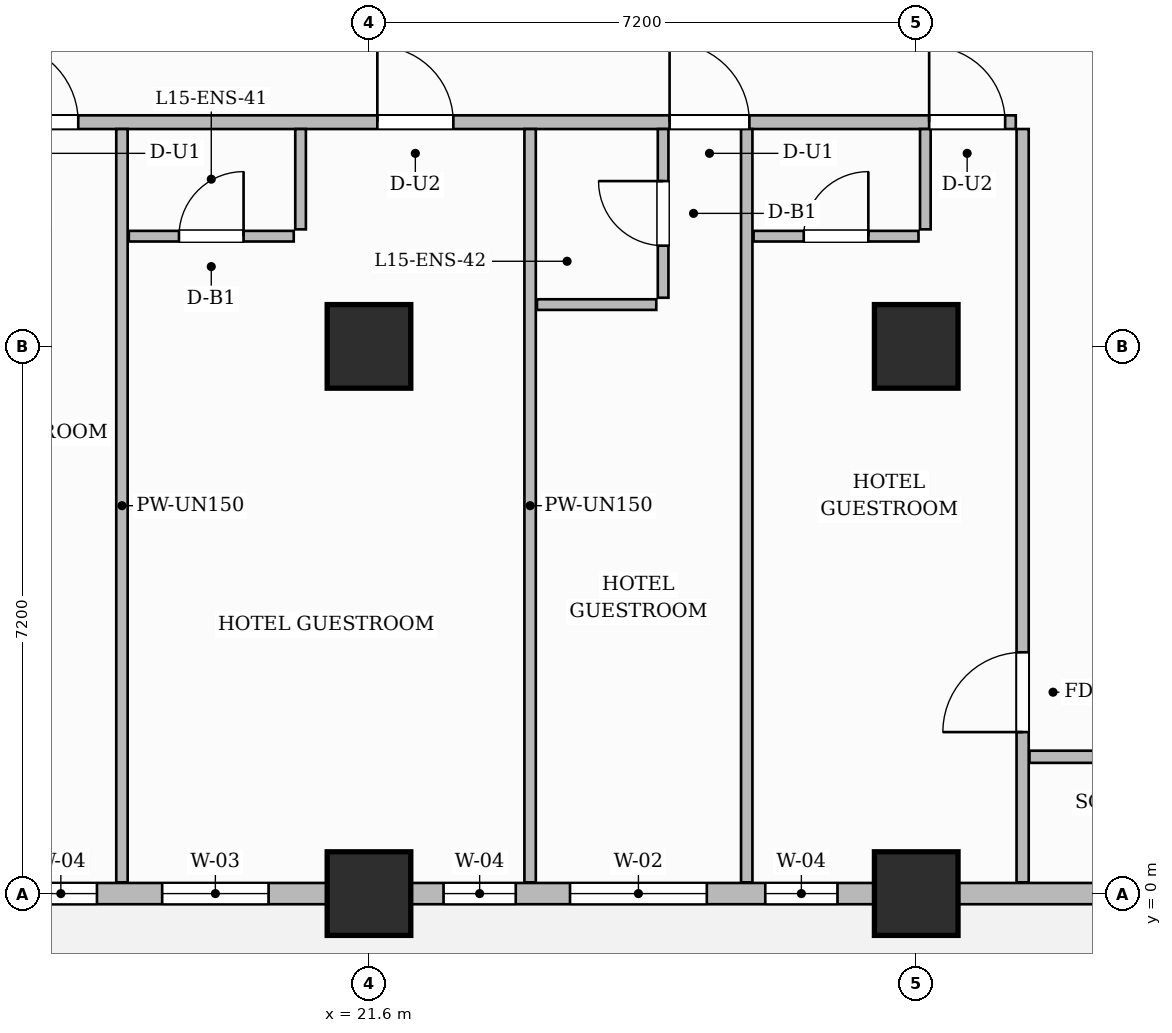
"""IFC4 building model, lengths in metres.
Left out: names, types, materials, properties, quantities, classifications, styles, units other than length and angle.
Written with IfcOpenShell. Run it as: python <this file> out.ifc"""

import sys

from ifc_helpers import new_model, si_unit, direction, frame, frame_2d, origin, origin_2d, place, context, subcontext, project, spatial, rectangle, extrude, source, transform, mapped, element, fill, save


model = new_model("IFC4")
c1 = context("Model", 3, precision=1e-05, world=origin(), true_north=direction((0.0, 1.0)))
c2 = subcontext(c1, "Body", "Model", "MODEL_VIEW")
j1 = project(units=[si_unit("LENGTHUNIT", "METRE"), si_unit("PLANEANGLEUNIT", "RADIAN")], contexts=[c1])
p1 = place(None, origin())
s1 = spatial("IfcSite", under=j1, at=p1, CompositionType="ELEMENT")
p2 = place(p1, origin())
s2 = spatial("IfcBuilding", under=s1, at=p2, CompositionType="ELEMENT")
p3 = place(p2, frame((0.0, 0.0, 65.7)))
s3 = spatial("IfcBuildingStorey", under=s2, at=p3, CompositionType="ELEMENT", Elevation=65.7)
m1 = source(origin(), c2, "Body", "SweptSolid", [
    extrude(rectangle(XDim=1.1, YDim=1.1, at=origin_2d()), origin(), (0.0, 0.0, 1.0), 3.7),
])
for number, where, z_axis, x_axis in (
    (1, (21.6, 0.0, 0.0), (0.0, 0.0, 1.0), (1.0, 0.0, 0.0)),
    (2, (21.6, 7.2, 0.0), (0.0, 0.0, 1.0), (1.0, 0.0, 0.0)),
    (3, (28.8, 0.0, 0.0), (0.0, 0.0, 1.0), (1.0, 0.0, 0.0)),
    (4, (28.8, 7.2, 0.0), (0.0, 0.0, 1.0), (1.0, 0.0, 0.0)),
):
    element("IfcColumn", number, at=place(p3, frame(where, z_axis=z_axis, x_axis=x_axis)), inside=s3, PredefinedType="COLUMN", context=c2, shape_type="MappedRepresentation", body=[
        mapped(m1, transform((0.0, 0.0, 0.0), scale=1.0)),
    ])
p4 = place(p3, frame((14.548, 10.15, 0.0), z_axis=(0.0, 0.0, 1.0), x_axis=(1.0, 0.0, 0.0)))
e5 = element("IfcWall", 5, at=p4, inside=s3, PredefinedType="PARTITIONING", context=c2, shape_type="SweptSolid", body=[
    extrude(rectangle(XDim=15.562, YDim=0.18, at=frame_2d((7.781, 0.0))), origin(), (0.0, 0.0, 1.0), 3.45),
])
p5 = place(p4, frame((2.177, 0.0, 0.0)))
e6 = element("IfcOpeningElement", 6, at=p5, cuts=e5, PredefinedType="OPENING", context=c2, shape_type="SweptSolid", body=[
    extrude(rectangle(XDim=1.05, YDim=2.25, at=frame_2d((0.525, 1.125))), frame((0.0, 0.1, 0.0), z_axis=(0.0, -1.0, 0.0), x_axis=(1.0, 0.0, 0.0)), (0.0, 0.0, 1.0), 0.2),
])
p6 = place(p4, frame((7.162, 0.0, 0.0)))
e7 = element("IfcOpeningElement", 7, at=p6, cuts=e5, PredefinedType="OPENING", context=c2, shape_type="SweptSolid", body=[
    extrude(rectangle(XDim=1.0, YDim=2.2, at=frame_2d((0.5, 1.1))), frame((0.0, 0.1, 0.0), z_axis=(0.0, -1.0, 0.0), x_axis=(1.0, 0.0, 0.0)), (0.0, 0.0, 1.0), 0.2),
])
p7 = place(p4, frame((11.007, 0.0, 0.0)))
e8 = element("IfcOpeningElement", 8, at=p7, cuts=e5, PredefinedType="OPENING", context=c2, shape_type="SweptSolid", body=[
    extrude(rectangle(XDim=1.05, YDim=2.25, at=frame_2d((0.525, 1.125))), frame((0.0, 0.1, 0.0), z_axis=(0.0, -1.0, 0.0), x_axis=(1.0, 0.0, 0.0)), (0.0, 0.0, 1.0), 0.2),
])
p8 = place(p4, frame((14.422, 0.0, 0.0)))
e9 = element("IfcOpeningElement", 9, at=p8, cuts=e5, PredefinedType="OPENING", context=c2, shape_type="SweptSolid", body=[
    extrude(rectangle(XDim=1.0, YDim=2.2, at=frame_2d((0.5, 1.1))), frame((0.0, 0.1, 0.0), z_axis=(0.0, -1.0, 0.0), x_axis=(1.0, 0.0, 0.0)), (0.0, 0.0, 1.0), 0.2),
])
p9 = place(p3, frame((30.2, 0.148, 0.0), z_axis=(0.0, 0.0, 1.0), x_axis=(0.0, 1.0, 0.0)))
e10 = element("IfcWall", 10, at=p9, inside=s3, PredefinedType="PARTITIONING", context=c2, shape_type="SweptSolid", body=[
    extrude(rectangle(XDim=9.912, YDim=0.16, at=frame_2d((4.956, 0.0))), origin(), (0.0, 0.0, 1.0), 3.45),
])
p10 = place(p9, frame((1.977, 0.0, 0.0)))
e11 = element("IfcOpeningElement", 11, at=p10, cuts=e10, PredefinedType="OPENING", context=c2, shape_type="SweptSolid", body=[
    extrude(rectangle(XDim=1.05, YDim=2.15, at=frame_2d((0.525, 1.075))), frame((0.0, 0.09, 0.0), z_axis=(0.0, -1.0, 0.0), x_axis=(1.0, 0.0, 0.0)), (0.0, 0.0, 1.0), 0.18),
])
p11 = place(p3, frame((30.29, 1.8, 0.0), z_axis=(0.0, 0.0, 1.0), x_axis=(1.0, 0.0, 0.0)))
e12 = element("IfcWall", 12, at=p11, inside=s3, PredefinedType="PARTITIONING", context=c2, shape_type="SweptSolid", body=[
    extrude(rectangle(XDim=19.37, YDim=0.16, at=frame_2d((9.685, 0.0))), origin(), (0.0, 0.0, 1.0), 3.45),
])
p12 = place(p11, frame((5.213, 0.0, 0.0)))
e13 = element("IfcOpeningElement", 13, at=p12, cuts=e12, PredefinedType="OPENING", context=c2, shape_type="SweptSolid", body=[
    extrude(rectangle(XDim=0.9, YDim=2.15, at=frame_2d((0.45, 1.075))), frame((0.0, 0.09, 0.0), z_axis=(0.0, -1.0, 0.0), x_axis=(1.0, 0.0, 0.0)), (0.0, 0.0, 1.0), 0.18),
])
p13 = place(p11, frame((14.06, 0.0, 0.0)))
e14 = element("IfcOpeningElement", 14, at=p13, cuts=e12, PredefinedType="OPENING", context=c2, shape_type="SweptSolid", body=[
    extrude(rectangle(XDim=0.9, YDim=2.15, at=frame_2d((0.45, 1.075))), frame((0.0, 0.09, 0.0), z_axis=(0.0, -1.0, 0.0), x_axis=(1.0, 0.0, 0.0)), (0.0, 0.0, 1.0), 0.18),
])
p14 = place(p3, frame((18.35, 0.148, 0.0), z_axis=(0.0, 0.0, 1.0), x_axis=(0.0, 1.0, 0.0)))
e15 = element("IfcWall", 15, at=p14, inside=s3, PredefinedType="PARTITIONING", context=c2, shape_type="SweptSolid", body=[
    extrude(rectangle(XDim=9.912, YDim=0.15, at=frame_2d((4.956, 0.0))), origin(), (0.0, 0.0, 1.0), 3.45),
])
p15 = place(p3, frame((20.7, 8.74, 0.0), z_axis=(0.0, 0.0, 1.0), x_axis=(0.0, 1.0, 0.0)))
e16 = element("IfcWall", 16, at=p15, inside=s3, PredefinedType="PARTITIONING", context=c2, shape_type="SweptSolid", body=[
    extrude(rectangle(XDim=1.32, YDim=0.14, at=frame_2d((0.66, 0.0))), origin(), (0.0, 0.0, 1.0), 3.45),
])
p16 = place(p3, frame((18.44, 8.65, 0.0), z_axis=(0.0, 0.0, 1.0), x_axis=(1.0, 0.0, 0.0)))
e17 = element("IfcWall", 17, at=p16, inside=s3, PredefinedType="PARTITIONING", context=c2, shape_type="SweptSolid", body=[
    extrude(rectangle(XDim=2.17, YDim=0.14, at=frame_2d((1.085, 0.0))), origin(), (0.0, 0.0, 1.0), 3.45),
])
p17 = place(p16, frame((0.66, 0.0, 0.0)))
e18 = element("IfcOpeningElement", 18, at=p17, cuts=e17, PredefinedType="OPENING", context=c2, shape_type="SweptSolid", body=[
    extrude(rectangle(XDim=0.85, YDim=2.1, at=frame_2d((0.425, 1.05))), frame((0.0, 0.08, 0.0), z_axis=(0.0, -1.0, 0.0), x_axis=(1.0, 0.0, 0.0)), (0.0, 0.0, 1.0), 0.16),
])
p18 = place(p3, frame((23.72, 0.148, 0.0), z_axis=(0.0, 0.0, 1.0), x_axis=(0.0, 1.0, 0.0)))
e19 = element("IfcWall", 19, at=p18, inside=s3, PredefinedType="PARTITIONING", context=c2, shape_type="SweptSolid", body=[
    extrude(rectangle(XDim=9.912, YDim=0.15, at=frame_2d((4.956, 0.0))), origin(), (0.0, 0.0, 1.0), 3.45),
])
p19 = place(p3, frame((25.47, 7.84, 0.0), z_axis=(0.0, 0.0, 1.0), x_axis=(0.0, 1.0, 0.0)))
e20 = element("IfcWall", 20, at=p19, inside=s3, PredefinedType="PARTITIONING", context=c2, shape_type="SweptSolid", body=[
    extrude(rectangle(XDim=2.22, YDim=0.14, at=frame_2d((1.11, 0.0))), origin(), (0.0, 0.0, 1.0), 3.45),
])
p20 = place(p19, frame((0.685, 0.0, 0.0)))
e21 = element("IfcOpeningElement", 21, at=p20, cuts=e20, PredefinedType="OPENING", context=c2, shape_type="SweptSolid", body=[
    extrude(rectangle(XDim=0.85, YDim=2.1, at=frame_2d((0.425, 1.05))), frame((0.0, 0.08, 0.0), z_axis=(0.0, -1.0, 0.0), x_axis=(1.0, 0.0, 0.0)), (0.0, 0.0, 1.0), 0.16),
])
p21 = place(p3, frame((23.81, 7.75, 0.0), z_axis=(0.0, 0.0, 1.0), x_axis=(1.0, 0.0, 0.0)))
e22 = element("IfcWall", 22, at=p21, inside=s3, PredefinedType="PARTITIONING", context=c2, shape_type="SweptSolid", body=[
    extrude(rectangle(XDim=1.57, YDim=0.14, at=frame_2d((0.785, 0.0))), origin(), (0.0, 0.0, 1.0), 3.45),
])
p22 = place(p3, frame((26.57, 0.148, 0.0), z_axis=(0.0, 0.0, 1.0), x_axis=(0.0, 1.0, 0.0)))
e23 = element("IfcWall", 23, at=p22, inside=s3, PredefinedType="PARTITIONING", context=c2, shape_type="SweptSolid", body=[
    extrude(rectangle(XDim=9.912, YDim=0.15, at=frame_2d((4.956, 0.0))), origin(), (0.0, 0.0, 1.0), 3.45),
])
p23 = place(p3, frame((28.92, 8.74, 0.0), z_axis=(0.0, 0.0, 1.0), x_axis=(0.0, 1.0, 0.0)))
e24 = element("IfcWall", 24, at=p23, inside=s3, PredefinedType="PARTITIONING", context=c2, shape_type="SweptSolid", body=[
    extrude(rectangle(XDim=1.32, YDim=0.14, at=frame_2d((0.66, 0.0))), origin(), (0.0, 0.0, 1.0), 2.885),
])
p24 = place(p3, frame((26.66, 8.65, 0.0), z_axis=(0.0, 0.0, 1.0), x_axis=(1.0, 0.0, 0.0)))
e25 = element("IfcWall", 25, at=p24, inside=s3, PredefinedType="PARTITIONING", context=c2, shape_type="SweptSolid", body=[
    extrude(rectangle(XDim=2.17, YDim=0.14, at=frame_2d((1.085, 0.0))), origin(), (0.0, 0.0, 1.0), 3.45),
])
p25 = place(p24, frame((0.66, 0.0, 0.0)))
e26 = element("IfcOpeningElement", 26, at=p25, cuts=e25, PredefinedType="OPENING", context=c2, shape_type="SweptSolid", body=[
    extrude(rectangle(XDim=0.85, YDim=2.1, at=frame_2d((0.425, 1.05))), frame((0.0, 0.08, 0.0), z_axis=(0.0, -1.0, 0.0), x_axis=(1.0, 0.0, 0.0)), (0.0, 0.0, 1.0), 0.16),
])
p26 = place(p3, frame((14.4, 0.0, 0.0), z_axis=(0.0, 0.0, 1.0), x_axis=(1.0, 0.0, 0.0)))
e27 = element("IfcWall", 27, at=p26, inside=s3, PredefinedType="SOLIDWALL", context=c2, shape_type="SweptSolid", body=[
    extrude(rectangle(XDim=43.2, YDim=0.28, at=frame_2d((21.6, 0.0))), origin(), (0.0, 0.0, 1.0), 2.885),
])
p27 = place(p26, frame((0.85, 0.0, 0.0)))
e28 = element("IfcOpeningElement", 28, at=p27, cuts=e27, PredefinedType="OPENING", context=c2, shape_type="SweptSolid", body=[
    extrude(rectangle(XDim=1.2, YDim=2.2, at=frame_2d((0.6, 1.1))), frame((0.0, 0.15, 0.0), z_axis=(0.0, -1.0, 0.0), x_axis=(1.0, 0.0, 0.0)), (0.0, 0.0, 1.0), 0.3),
])
p28 = place(p26, frame((2.671, 0.0, 0.8)))
e29 = element("IfcOpeningElement", 29, at=p28, cuts=e27, PredefinedType="OPENING", context=c2, shape_type="SweptSolid", body=[
    extrude(rectangle(XDim=0.95, YDim=1.75, at=frame_2d((0.475, 0.875))), frame((0.0, 0.15, 0.0), z_axis=(0.0, -1.0, 0.0), x_axis=(1.0, 0.0, 0.0)), (0.0, 0.0, 1.0), 0.3),
])
p29 = place(p26, frame((4.479, 0.0, 0.8)))
e30 = element("IfcOpeningElement", 30, at=p29, cuts=e27, PredefinedType="OPENING", context=c2, shape_type="SweptSolid", body=[
    extrude(rectangle(XDim=1.4, YDim=1.85, at=frame_2d((0.7, 0.925))), frame((0.0, 0.15, 0.0), z_axis=(0.0, -1.0, 0.0), x_axis=(1.0, 0.0, 0.0)), (0.0, 0.0, 1.0), 0.3),
])
p30 = place(p26, frame((8.181, 0.0, 0.8)))
e31 = element("IfcOpeningElement", 31, at=p30, cuts=e27, PredefinedType="OPENING", context=c2, shape_type="SweptSolid", body=[
    extrude(rectangle(XDim=0.95, YDim=1.75, at=frame_2d((0.475, 0.875))), frame((0.0, 0.15, 0.0), z_axis=(0.0, -1.0, 0.0), x_axis=(1.0, 0.0, 0.0)), (0.0, 0.0, 1.0), 0.3),
])
p31 = place(p26, frame((9.845, 0.0, 0.8)))
e32 = element("IfcOpeningElement", 32, at=p31, cuts=e27, PredefinedType="OPENING", context=c2, shape_type="SweptSolid", body=[
    extrude(rectangle(XDim=1.8, YDim=1.85, at=frame_2d((0.9, 0.925))), frame((0.0, 0.15, 0.0), z_axis=(0.0, -1.0, 0.0), x_axis=(1.0, 0.0, 0.0)), (0.0, 0.0, 1.0), 0.3),
])
p32 = place(p26, frame((12.414, 0.0, 0.8)))
e33 = element("IfcOpeningElement", 33, at=p32, cuts=e27, PredefinedType="OPENING", context=c2, shape_type="SweptSolid", body=[
    extrude(rectangle(XDim=0.95, YDim=1.75, at=frame_2d((0.475, 0.875))), frame((0.0, 0.15, 0.0), z_axis=(0.0, -1.0, 0.0), x_axis=(1.0, 0.0, 0.0)), (0.0, 0.0, 1.0), 0.3),
])
p33 = place(p26, frame((16.804, 0.0, 0.8)))
e34 = element("IfcOpeningElement", 34, at=p33, cuts=e27, PredefinedType="OPENING", context=c2, shape_type="SweptSolid", body=[
    extrude(rectangle(XDim=1.8, YDim=1.85, at=frame_2d((0.9, 0.925))), frame((0.0, 0.15, 0.0), z_axis=(0.0, -1.0, 0.0), x_axis=(1.0, 0.0, 0.0)), (0.0, 0.0, 1.0), 0.3),
])
p34 = place(p26, frame((22.396, 0.0, 0.8)))
e35 = element("IfcOpeningElement", 35, at=p34, cuts=e27, PredefinedType="OPENING", context=c2, shape_type="SweptSolid", body=[
    extrude(rectangle(XDim=1.8, YDim=1.85, at=frame_2d((0.9, 0.925))), frame((0.0, 0.15, 0.0), z_axis=(0.0, -1.0, 0.0), x_axis=(1.0, 0.0, 0.0)), (0.0, 0.0, 1.0), 0.3),
])
p35 = place(p26, frame((25.629, 0.0, 0.8)))
e36 = element("IfcOpeningElement", 36, at=p35, cuts=e27, PredefinedType="OPENING", context=c2, shape_type="SweptSolid", body=[
    extrude(rectangle(XDim=0.95, YDim=1.75, at=frame_2d((0.475, 0.875))), frame((0.0, 0.15, 0.0), z_axis=(0.0, -1.0, 0.0), x_axis=(1.0, 0.0, 0.0)), (0.0, 0.0, 1.0), 0.3),
])
p36 = place(p26, frame((29.075, 0.0, 0.8)))
e37 = element("IfcOpeningElement", 37, at=p36, cuts=e27, PredefinedType="OPENING", context=c2, shape_type="SweptSolid", body=[
    extrude(rectangle(XDim=1.8, YDim=1.85, at=frame_2d((0.9, 0.925))), frame((0.0, 0.15, 0.0), z_axis=(0.0, -1.0, 0.0), x_axis=(1.0, 0.0, 0.0)), (0.0, 0.0, 1.0), 0.3),
])
p37 = place(p26, frame((32.125, 0.0, 0.8)))
e38 = element("IfcOpeningElement", 38, at=p37, cuts=e27, PredefinedType="OPENING", context=c2, shape_type="SweptSolid", body=[
    extrude(rectangle(XDim=1.8, YDim=1.85, at=frame_2d((0.9, 0.925))), frame((0.0, 0.15, 0.0), z_axis=(0.0, -1.0, 0.0), x_axis=(1.0, 0.0, 0.0)), (0.0, 0.0, 1.0), 0.3),
])
p38 = place(p26, frame((36.946, 0.0, 0.8)))
e39 = element("IfcOpeningElement", 39, at=p38, cuts=e27, PredefinedType="OPENING", context=c2, shape_type="SweptSolid", body=[
    extrude(rectangle(XDim=1.8, YDim=1.85, at=frame_2d((0.9, 0.925))), frame((0.0, 0.15, 0.0), z_axis=(0.0, -1.0, 0.0), x_axis=(1.0, 0.0, 0.0)), (0.0, 0.0, 1.0), 0.3),
])
p39 = place(p26, frame((40.054, 0.0, 0.8)))
e40 = element("IfcOpeningElement", 40, at=p39, cuts=e27, PredefinedType="OPENING", context=c2, shape_type="SweptSolid", body=[
    extrude(rectangle(XDim=1.8, YDim=1.85, at=frame_2d((0.9, 0.925))), frame((0.0, 0.15, 0.0), z_axis=(0.0, -1.0, 0.0), x_axis=(1.0, 0.0, 0.0)), (0.0, 0.0, 1.0), 0.3),
])
m2 = source(origin(), c2, "Body", "SweptSolid", [
    extrude(rectangle(XDim=1.05, YDim=2.15, at=frame_2d((0.525, 1.075))), frame((0.0, 0.025, 0.0), z_axis=(0.0, -1.0, 0.0), x_axis=(1.0, 0.0, 0.0)), (0.0, 0.0, 1.0), 0.05),
])
p40 = place(p10, origin())
e41 = element("IfcDoor", 41, at=p40, inside=s3, OperationType="SINGLE_SWING_LEFT", PredefinedType="DOOR", context=c2, shape_type="MappedRepresentation", body=[
    mapped(m2, transform((0.0, 0.0, 0.0), scale=1.0)),
])
fill(e11, e41)
m3 = source(origin(), c2, "Body", "SweptSolid", [
    extrude(rectangle(XDim=1.05, YDim=2.25, at=frame_2d((0.525, 1.125))), frame((0.0, 0.025, 0.0), z_axis=(0.0, -1.0, 0.0), x_axis=(1.0, 0.0, 0.0)), (0.0, 0.0, 1.0), 0.05),
])
p41 = place(p5, origin())
e42 = element("IfcDoor", 42, at=p41, inside=s3, OperationType="SINGLE_SWING_LEFT", PredefinedType="DOOR", context=c2, shape_type="MappedRepresentation", body=[
    mapped(m3, transform((0.0, 0.0, 0.0), scale=1.0)),
])
fill(e6, e42)
m4 = source(origin(), c2, "Body", "SweptSolid", [
    extrude(rectangle(XDim=0.85, YDim=2.1, at=frame_2d((0.425, 1.05))), frame((0.0, 0.025, 0.0), z_axis=(0.0, -1.0, 0.0), x_axis=(1.0, 0.0, 0.0)), (0.0, 0.0, 1.0), 0.05),
])
p42 = place(p17, origin())
e43 = element("IfcDoor", 43, at=p42, inside=s3, OperationType="SINGLE_SWING_RIGHT", PredefinedType="DOOR", context=c2, shape_type="MappedRepresentation", body=[
    mapped(m4, transform((0.0, 0.0, 0.0), scale=1.0)),
])
fill(e18, e43)
m5 = source(origin(), c2, "Body", "SweptSolid", [
    extrude(rectangle(XDim=1.0, YDim=2.2, at=frame_2d((0.5, 1.1))), frame((0.0, 0.025, 0.0), z_axis=(0.0, -1.0, 0.0), x_axis=(1.0, 0.0, 0.0)), (0.0, 0.0, 1.0), 0.05),
])
p43 = place(p6, origin())
e44 = element("IfcDoor", 44, at=p43, inside=s3, OperationType="SINGLE_SWING_LEFT", PredefinedType="DOOR", context=c2, shape_type="MappedRepresentation", body=[
    mapped(m5, transform((0.0, 0.0, 0.0), scale=1.0)),
])
fill(e7, e44)
p44 = place(p20, origin())
e45 = element("IfcDoor", 45, at=p44, inside=s3, OperationType="SINGLE_SWING_RIGHT", PredefinedType="DOOR", context=c2, shape_type="MappedRepresentation", body=[
    mapped(m4, transform((0.0, 0.0, 0.0), scale=1.0)),
])
fill(e21, e45)
p45 = place(p7, origin())
e46 = element("IfcDoor", 46, at=p45, inside=s3, OperationType="SINGLE_SWING_LEFT", PredefinedType="DOOR", context=c2, shape_type="MappedRepresentation", body=[
    mapped(m3, transform((0.0, 0.0, 0.0), scale=1.0)),
])
fill(e8, e46)
p46 = place(p25, origin())
e47 = element("IfcDoor", 47, at=p46, inside=s3, OperationType="SINGLE_SWING_RIGHT", PredefinedType="DOOR", context=c2, shape_type="MappedRepresentation", body=[
    mapped(m4, transform((0.0, 0.0, 0.0), scale=1.0)),
])
fill(e26, e47)
p47 = place(p8, origin())
e48 = element("IfcDoor", 48, at=p47, inside=s3, OperationType="SINGLE_SWING_LEFT", PredefinedType="DOOR", context=c2, shape_type="MappedRepresentation", body=[
    mapped(m5, transform((0.0, 0.0, 0.0), scale=1.0)),
])
fill(e9, e48)
m6 = source(origin(), c2, "Body", "SweptSolid", [
    extrude(rectangle(XDim=0.95, YDim=1.75, at=frame_2d((0.475, 0.875))), frame((0.0, 0.03, 0.0), z_axis=(0.0, -1.0, 0.0), x_axis=(1.0, 0.0, 0.0)), (0.0, 0.0, 1.0), 0.06),
])
p48 = place(p28, origin())
e49 = element("IfcWindow", 49, at=p48, inside=s3, PartitioningType="SINGLE_PANEL", PredefinedType="WINDOW", context=c2, shape_type="MappedRepresentation", body=[
    mapped(m6, transform((0.0, 0.0, 0.0), scale=1.0)),
])
fill(e29, e49)
m7 = source(origin(), c2, "Body", "SweptSolid", [
    extrude(rectangle(XDim=1.4, YDim=1.85, at=frame_2d((0.7, 0.925))), frame((0.0, 0.03, 0.0), z_axis=(0.0, -1.0, 0.0), x_axis=(1.0, 0.0, 0.0)), (0.0, 0.0, 1.0), 0.06),
])
p49 = place(p29, origin())
e50 = element("IfcWindow", 50, at=p49, inside=s3, PartitioningType="SINGLE_PANEL", PredefinedType="WINDOW", context=c2, shape_type="MappedRepresentation", body=[
    mapped(m7, transform((0.0, 0.0, 0.0), scale=1.0)),
])
fill(e30, e50)
p50 = place(p30, origin())
e51 = element("IfcWindow", 51, at=p50, inside=s3, PartitioningType="SINGLE_PANEL", PredefinedType="WINDOW", context=c2, shape_type="MappedRepresentation", body=[
    mapped(m6, transform((0.0, 0.0, 0.0), scale=1.0)),
])
fill(e31, e51)
m8 = source(origin(), c2, "Body", "SweptSolid", [
    extrude(rectangle(XDim=1.8, YDim=1.85, at=frame_2d((0.9, 0.925))), frame((0.0, 0.03, 0.0), z_axis=(0.0, -1.0, 0.0), x_axis=(1.0, 0.0, 0.0)), (0.0, 0.0, 1.0), 0.06),
])
p51 = place(p31, origin())
e52 = element("IfcWindow", 52, at=p51, inside=s3, PartitioningType="DOUBLE_PANEL_VERTICAL", PredefinedType="WINDOW", context=c2, shape_type="MappedRepresentation", body=[
    mapped(m8, transform((0.0, 0.0, 0.0), scale=1.0)),
])
fill(e32, e52)
p52 = place(p32, origin())
e53 = element("IfcWindow", 53, at=p52, inside=s3, PartitioningType="SINGLE_PANEL", PredefinedType="WINDOW", context=c2, shape_type="MappedRepresentation", body=[
    mapped(m6, transform((0.0, 0.0, 0.0), scale=1.0)),
])
fill(e33, e53)
save(model, sys.argv[1])
